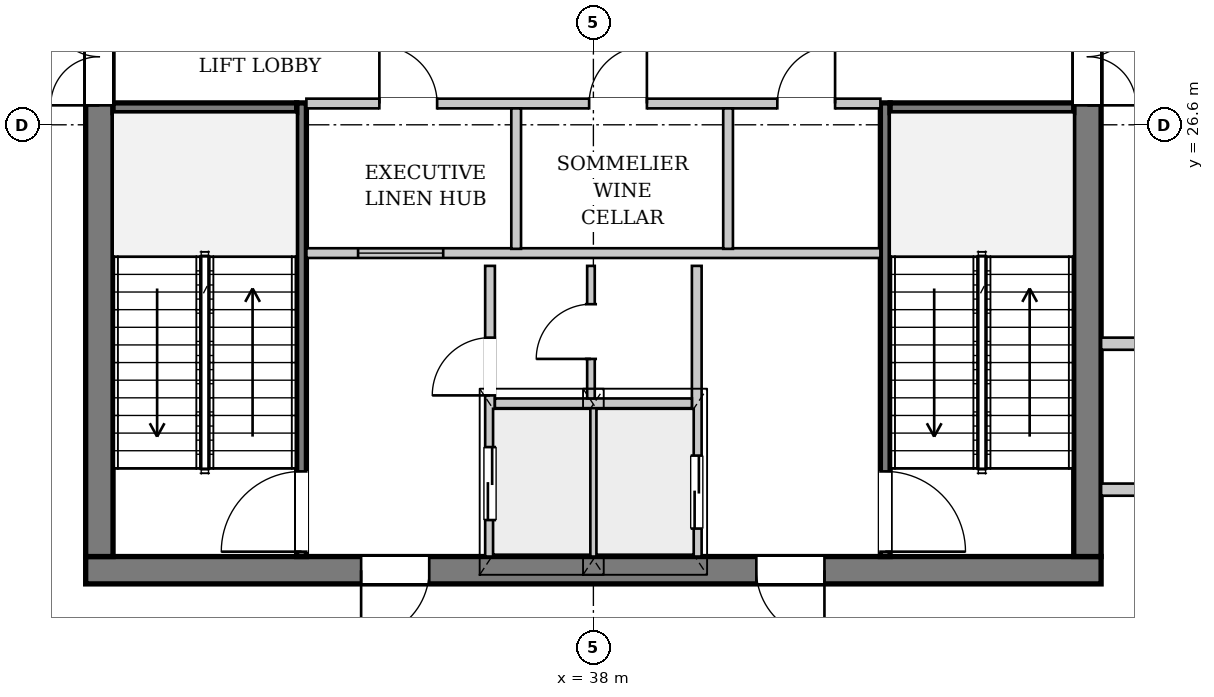
"""IFC4 building model, lengths in metres.
Left out: names, types, materials, properties, quantities, classifications, styles, units other than length and angle.
Written with IfcOpenShell. Run it as: python <this file> out.ifc"""

import sys

from ifc_helpers import new_model, si_unit, direction, frame, frame_2d, origin, place, context, subcontext, project, spatial, rectangle, extrude, source, transform, mapped, element, fill, save


model = new_model("IFC4")
c1 = context("Model", 3, precision=1e-05, world=origin(), true_north=direction((0.0, 1.0)))
c2 = subcontext(c1, "Body", "Model", "MODEL_VIEW")
j1 = project(units=[si_unit("LENGTHUNIT", "METRE"), si_unit("PLANEANGLEUNIT", "RADIAN")], contexts=[c1])
p1 = place(None, origin())
s1 = spatial("IfcSite", under=j1, at=p1, CompositionType="ELEMENT")
p2 = place(p1, origin())
s2 = spatial("IfcBuilding", under=s1, at=p2, CompositionType="ELEMENT")
p3 = place(p2, frame((0.0, 0.0, 290.5)))
s3 = spatial("IfcBuildingStorey", under=s2, at=p3, CompositionType="ELEMENT", Elevation=290.5)
p4 = place(p3, frame((32.694, 12.155, 0.0), z_axis=(0.0, 0.0, 1.0), x_axis=(-0.89278116215, 0.450490617561, 0.0)))
e1 = element("IfcWall", 1, at=p4, inside=s3, PredefinedType="SOLIDWALL", context=c2, shape_type="SweptSolid", body=[
    extrude(rectangle(XDim=17.119, YDim=0.32, at=frame_2d((8.56, 0.0))), origin(), (0.0, 0.0, 1.0), 3.782),
])
p5 = place(p4, frame((4.728, 0.0, 0.0)))
e2 = element("IfcOpeningElement", 2, at=p5, cuts=e1, PredefinedType="OPENING", context=c2, shape_type="SweptSolid", body=[
    extrude(rectangle(XDim=1.5, YDim=2.3, at=frame_2d((0.75, 1.15))), frame((0.0, 0.17, 0.0), z_axis=(0.0, -1.0, 0.0), x_axis=(1.0, 0.0, 0.0)), (0.0, 0.0, 1.0), 0.34),
])
p6 = place(p4, frame((11.368, 0.0, 0.65)))
e3 = element("IfcOpeningElement", 3, at=p6, cuts=e1, PredefinedType="OPENING", context=c2, shape_type="SweptSolid", body=[
    extrude(rectangle(XDim=2.6, YDim=2.35, at=frame_2d((1.3, 1.175))), frame((0.0, 0.17, 0.0), z_axis=(0.0, -1.0, 0.0), x_axis=(1.0, 0.0, 0.0)), (0.0, 0.0, 1.0), 0.34),
])
p7 = place(p3, frame((46.35, 19.275, 0.0), z_axis=(0.0, 0.0, 1.0), x_axis=(-1.0, 0.0, 0.0)))
e4 = element("IfcWall", 4, at=p7, inside=s3, PredefinedType="SHEAR", context=c2, shape_type="SweptSolid", body=[
    extrude(rectangle(XDim=16.7, YDim=0.45, at=frame_2d((8.35, 0.0))), origin(), (0.0, 0.0, 1.0), 4.24),
])
p8 = place(p7, frame((4.55, 0.0, 0.0)))
e5 = element("IfcOpeningElement", 5, at=p8, cuts=e4, PredefinedType="OPENING", context=c2, shape_type="SweptSolid", body=[
    extrude(rectangle(XDim=1.12, YDim=2.25, at=frame_2d((0.56, 1.125))), frame((0.0, 0.235, 0.0), z_axis=(0.0, -1.0, 0.0), x_axis=(1.0, 0.0, 0.0)), (0.0, 0.0, 1.0), 0.47),
])
p9 = place(p7, frame((11.05, 0.0, 0.0)))
e6 = element("IfcOpeningElement", 6, at=p9, cuts=e4, PredefinedType="OPENING", context=c2, shape_type="SweptSolid", body=[
    extrude(rectangle(XDim=1.12, YDim=2.25, at=frame_2d((0.56, 1.125))), frame((0.0, 0.235, 0.0), z_axis=(0.0, -1.0, 0.0), x_axis=(1.0, 0.0, 0.0)), (0.0, 0.0, 1.0), 0.47),
])
p10 = place(p3, frame((29.875, 19.5, 0.0), z_axis=(0.0, 0.0, 1.0), x_axis=(0.0, 1.0, 0.0)))
e7 = element("IfcWall", 7, at=p10, inside=s3, PredefinedType="SHEAR", context=c2, shape_type="SweptSolid", body=[
    extrude(rectangle(XDim=14.2, YDim=0.45, at=frame_2d((7.1, 0.0))), origin(), (0.0, 0.0, 1.0), 4.24),
])
p11 = place(p10, frame((7.42, 0.0, 0.0)))
e8 = element("IfcOpeningElement", 8, at=p11, cuts=e7, PredefinedType="OPENING", context=c2, shape_type="SweptSolid", body=[
    extrude(rectangle(XDim=1.6, YDim=2.2, at=frame_2d((0.8, 1.1))), frame((0.0, 0.235, 0.0), z_axis=(0.0, -1.0, 0.0), x_axis=(1.0, 0.0, 0.0)), (0.0, 0.0, 1.0), 0.47),
])
p12 = place(p3, frame((46.125, 33.7, 0.0), z_axis=(0.0, 0.0, 1.0), x_axis=(0.0, -1.0, 0.0)))
e9 = element("IfcWall", 9, at=p12, inside=s3, PredefinedType="SHEAR", context=c2, shape_type="SweptSolid", body=[
    extrude(rectangle(XDim=14.2, YDim=0.45, at=frame_2d((7.1, 0.0))), origin(), (0.0, 0.0, 1.0), 4.24),
])
p13 = place(p12, frame((5.18, 0.0, 0.0)))
e10 = element("IfcOpeningElement", 10, at=p13, cuts=e9, PredefinedType="OPENING", context=c2, shape_type="SweptSolid", body=[
    extrude(rectangle(XDim=1.6, YDim=2.2, at=frame_2d((0.8, 1.1))), frame((0.0, 0.235, 0.0), z_axis=(0.0, -1.0, 0.0), x_axis=(1.0, 0.0, 0.0)), (0.0, 0.0, 1.0), 0.47),
])
p14 = place(p12, frame((2.05, 0.0, 0.0)))
e11 = element("IfcOpeningElement", 11, at=p14, cuts=e9, PredefinedType="OPENING", context=c2, shape_type="SweptSolid", body=[
    extrude(rectangle(XDim=0.95, YDim=2.1, at=frame_2d((0.475, 1.05))), frame((0.0, 0.235, 0.0), z_axis=(0.0, -1.0, 0.0), x_axis=(1.0, 0.0, 0.0)), (0.0, 0.0, 1.0), 0.47),
])
p15 = place(p3, frame((33.2, 19.5, 0.0), z_axis=(0.0, 0.0, 1.0), x_axis=(0.0, 1.0, 0.0)))
e12 = element("IfcWall", 12, at=p15, inside=s3, PredefinedType="PARTITIONING", context=c2, shape_type="SweptSolid", body=[
    extrude(rectangle(XDim=7.46, YDim=0.16, at=frame_2d((3.73, 0.0))), origin(), (0.0, 0.0, 1.0), 4.24),
])
p16 = place(p15, frame((0.08, 0.0, 0.0)))
e13 = element("IfcOpeningElement", 13, at=p16, cuts=e12, PredefinedType="OPENING", context=c2, shape_type="SweptSolid", body=[
    extrude(rectangle(XDim=1.32, YDim=2.2, at=frame_2d((0.66, 1.1))), frame((0.0, 0.09, 0.0), z_axis=(0.0, -1.0, 0.0), x_axis=(1.0, 0.0, 0.0)), (0.0, 0.0, 1.0), 0.18),
])
p17 = place(p3, frame((30.1, 26.88, 0.0), z_axis=(0.0, 0.0, 1.0), x_axis=(1.0, 0.0, 0.0)))
e14 = element("IfcWall", 14, at=p17, inside=s3, PredefinedType="PARTITIONING", context=c2, shape_type="SweptSolid", body=[
    extrude(rectangle(XDim=3.02, YDim=0.16, at=frame_2d((1.51, 0.0))), origin(), (0.0, 0.0, 1.0), 4.24),
])
p18 = place(p3, frame((42.8, 26.96, 0.0), z_axis=(0.0, 0.0, 1.0), x_axis=(0.0, -1.0, 0.0)))
e15 = element("IfcWall", 15, at=p18, inside=s3, PredefinedType="PARTITIONING", context=c2, shape_type="SweptSolid", body=[
    extrude(rectangle(XDim=7.46, YDim=0.16, at=frame_2d((3.73, 0.0))), origin(), (0.0, 0.0, 1.0), 4.24),
])
p19 = place(p18, frame((6.06, 0.0, 0.0)))
e16 = element("IfcOpeningElement", 16, at=p19, cuts=e15, PredefinedType="OPENING", context=c2, shape_type="SweptSolid", body=[
    extrude(rectangle(XDim=1.32, YDim=2.2, at=frame_2d((0.66, 1.1))), frame((0.0, 0.09, 0.0), z_axis=(0.0, -1.0, 0.0), x_axis=(1.0, 0.0, 0.0)), (0.0, 0.0, 1.0), 0.18),
])
p20 = place(p3, frame((42.88, 26.88, 0.0), z_axis=(0.0, 0.0, 1.0), x_axis=(1.0, 0.0, 0.0)))
e17 = element("IfcWall", 17, at=p20, inside=s3, PredefinedType="PARTITIONING", context=c2, shape_type="SweptSolid", body=[
    extrude(rectangle(XDim=3.02, YDim=0.16, at=frame_2d((1.51, 0.0))), origin(), (0.0, 0.0, 1.0), 4.24),
])
p21 = place(p3, frame((36.3, 19.5, 0.0), z_axis=(0.0, 0.0, 1.0), x_axis=(0.0, 1.0, 0.0)))
e18 = element("IfcWall", 18, at=p21, inside=s3, PredefinedType="PARTITIONING", context=c2, shape_type="SweptSolid", body=[
    extrude(rectangle(XDim=4.78, YDim=0.16, at=frame_2d((2.39, 0.0))), origin(), (0.0, 0.0, 1.0), 4.24),
])
p22 = place(p21, frame((0.6, 0.0, 0.0)))
e19 = element("IfcOpeningElement", 19, at=p22, cuts=e18, PredefinedType="OPENING", context=c2, shape_type="SweptSolid", body=[
    extrude(rectangle(XDim=1.2, YDim=2.2, at=frame_2d((0.6, 1.1))), frame((0.0, 0.09, 0.0), z_axis=(0.0, -1.0, 0.0), x_axis=(1.0, 0.0, 0.0)), (0.0, 0.0, 1.0), 0.18),
])
p23 = place(p21, frame((2.65, 0.0, 0.0)))
e20 = element("IfcOpeningElement", 20, at=p23, cuts=e18, PredefinedType="OPENING", context=c2, shape_type="SweptSolid", body=[
    extrude(rectangle(XDim=0.95, YDim=2.1, at=frame_2d((0.475, 1.05))), frame((0.0, 0.09, 0.0), z_axis=(0.0, -1.0, 0.0), x_axis=(1.0, 0.0, 0.0)), (0.0, 0.0, 1.0), 0.18),
])
p24 = place(p3, frame((39.7, 24.28, 0.0), z_axis=(0.0, 0.0, 1.0), x_axis=(0.0, -1.0, 0.0)))
e21 = element("IfcWall", 21, at=p24, inside=s3, PredefinedType="PARTITIONING", context=c2, shape_type="SweptSolid", body=[
    extrude(rectangle(XDim=4.78, YDim=0.16, at=frame_2d((2.39, 0.0))), origin(), (0.0, 0.0, 1.0), 4.24),
])
p25 = place(p24, frame((3.12, 0.0, 0.0)))
e22 = element("IfcOpeningElement", 22, at=p25, cuts=e21, PredefinedType="OPENING", context=c2, shape_type="SweptSolid", body=[
    extrude(rectangle(XDim=1.2, YDim=2.2, at=frame_2d((0.6, 1.1))), frame((0.0, 0.09, 0.0), z_axis=(0.0, -1.0, 0.0), x_axis=(1.0, 0.0, 0.0)), (0.0, 0.0, 1.0), 0.18),
])
p26 = place(p3, frame((38.0, 19.5, 0.0), z_axis=(0.0, 0.0, 1.0), x_axis=(0.0, 1.0, 0.0)))
e23 = element("IfcWall", 23, at=p26, inside=s3, PredefinedType="PARTITIONING", context=c2, shape_type="SweptSolid", body=[
    extrude(rectangle(XDim=2.46, YDim=0.125, at=frame_2d((1.23, 0.0))), origin(), (0.0, 0.0, 1.0), 4.24),
])
p27 = place(p3, frame((36.38, 22.02, 0.0), z_axis=(0.0, 0.0, 1.0), x_axis=(1.0, 0.0, 0.0)))
e24 = element("IfcWall", 24, at=p27, inside=s3, PredefinedType="PARTITIONING", context=c2, shape_type="SweptSolid", body=[
    extrude(rectangle(XDim=3.24, YDim=0.16, at=frame_2d((1.62, 0.0))), origin(), (0.0, 0.0, 1.0), 4.24),
])
p28 = place(p3, frame((33.28, 24.49, 0.0), z_axis=(0.0, 0.0, 1.0), x_axis=(1.0, 0.0, 0.0)))
e25 = element("IfcWall", 25, at=p28, inside=s3, PredefinedType="PARTITIONING", context=c2, shape_type="SweptSolid", body=[
    extrude(rectangle(XDim=9.44, YDim=0.16, at=frame_2d((4.72, 0.0))), origin(), (0.0, 0.0, 1.0), 4.24),
])
p29 = place(p28, frame((0.85, 0.0, 0.95)))
e26 = element("IfcOpeningElement", 26, at=p29, cuts=e25, PredefinedType="OPENING", context=c2, shape_type="SweptSolid", body=[
    extrude(rectangle(XDim=1.4, YDim=1.8, at=frame_2d((0.7, 0.9))), frame((0.0, 0.09, 0.0), z_axis=(0.0, -1.0, 0.0), x_axis=(1.0, 0.0, 0.0)), (0.0, 0.0, 1.0), 0.18),
])
p30 = place(p3, frame((37.96, 22.1, 0.0), z_axis=(0.0, 0.0, 1.0), x_axis=(0.0, 1.0, 0.0)))
e27 = element("IfcWall", 27, at=p30, inside=s3, PredefinedType="PARTITIONING", context=c2, shape_type="SweptSolid", body=[
    extrude(rectangle(XDim=2.18, YDim=0.125, at=frame_2d((1.09, 0.0))), origin(), (0.0, 0.0, 1.0), 4.24),
])
p31 = place(p30, frame((0.65, 0.0, 0.0)))
e28 = element("IfcOpeningElement", 28, at=p31, cuts=e27, PredefinedType="OPENING", context=c2, shape_type="SweptSolid", body=[
    extrude(rectangle(XDim=0.9, YDim=2.1, at=frame_2d((0.45, 1.05))), frame((0.0, 0.073, 0.0), z_axis=(0.0, -1.0, 0.0), x_axis=(1.0, 0.0, 0.0)), (0.0, 0.0, 1.0), 0.145),
])
p32 = place(p3, frame((33.28, 26.95, 0.0), z_axis=(0.0, 0.0, 1.0), x_axis=(1.0, 0.0, 0.0)))
e29 = element("IfcWall", 29, at=p32, inside=s3, PredefinedType="PARTITIONING", context=c2, shape_type="SweptSolid", body=[
    extrude(rectangle(XDim=9.44, YDim=0.16, at=frame_2d((4.72, 0.0))), origin(), (0.0, 0.0, 1.0), 4.24),
])
p33 = place(p32, frame((1.2, 0.0, 0.0)))
e30 = element("IfcOpeningElement", 30, at=p33, cuts=e29, PredefinedType="OPENING", context=c2, shape_type="SweptSolid", body=[
    extrude(rectangle(XDim=0.95, YDim=2.1, at=frame_2d((0.475, 1.05))), frame((0.0, 0.09, 0.0), z_axis=(0.0, -1.0, 0.0), x_axis=(1.0, 0.0, 0.0)), (0.0, 0.0, 1.0), 0.18),
])
p34 = place(p32, frame((4.65, 0.0, 0.0)))
e31 = element("IfcOpeningElement", 31, at=p34, cuts=e29, PredefinedType="OPENING", context=c2, shape_type="SweptSolid", body=[
    extrude(rectangle(XDim=0.95, YDim=2.1, at=frame_2d((0.475, 1.05))), frame((0.0, 0.09, 0.0), z_axis=(0.0, -1.0, 0.0), x_axis=(1.0, 0.0, 0.0)), (0.0, 0.0, 1.0), 0.18),
])
p35 = place(p32, frame((7.745, 0.0, 0.0)))
e32 = element("IfcOpeningElement", 32, at=p35, cuts=e29, PredefinedType="OPENING", context=c2, shape_type="SweptSolid", body=[
    extrude(rectangle(XDim=0.95, YDim=2.1, at=frame_2d((0.475, 1.05))), frame((0.0, 0.09, 0.0), z_axis=(0.0, -1.0, 0.0), x_axis=(1.0, 0.0, 0.0)), (0.0, 0.0, 1.0), 0.18),
])
for number, where, z_axis, x_axis in (
    (33, (36.73, 24.56, 0.0), (0.0, 0.0, 1.0), (0.0, 1.0, 0.0)),
    (34, (40.215, 24.56, 0.0), (0.0, 0.0, 1.0), (0.0, 1.0, 0.0)),
):
    element("IfcWall", number, at=place(p3, frame(where, z_axis=z_axis, x_axis=x_axis)), inside=s3, PredefinedType="PARTITIONING", context=c2, shape_type="SweptSolid", body=[
        extrude(rectangle(XDim=2.31, YDim=0.16, at=frame_2d((1.155, 0.0))), origin(), (0.0, 0.0, 1.0), 4.24),
    ])
for number, where, z_axis, x_axis in (
    (35, (46.35, 20.6, 0.0), (0.0, 0.0, 1.0), (1.0, 0.0, 0.0)),
    (36, (46.35, 23.0, 0.0), (0.0, 0.0, 1.0), (1.0, 0.0, 0.0)),
):
    element("IfcWall", number, at=place(p3, frame(where, z_axis=z_axis, x_axis=x_axis)), inside=s3, PredefinedType="PARTITIONING", context=c2, shape_type="SweptSolid", body=[
        extrude(rectangle(XDim=1.85, YDim=0.2, at=frame_2d((0.925, 0.0))), origin(), (0.0, 0.0, 1.0), 4.24),
    ])
m1 = source(origin(), c2, "Body", "SweptSolid", [
    extrude(rectangle(XDim=1.12, YDim=2.25, at=frame_2d((0.56, 1.125))), frame((0.0, 0.025, 0.0), z_axis=(0.0, -1.0, 0.0), x_axis=(1.0, 0.0, 0.0)), (0.0, 0.0, 1.0), 0.05),
])
p36 = place(p8, origin())
e37 = element("IfcDoor", 37, at=p36, inside=s3, OperationType="SINGLE_SWING_LEFT", PredefinedType="DOOR", context=c2, shape_type="MappedRepresentation", body=[
    mapped(m1, transform((0.0, 0.0, 0.0), x_axis=(1.0, 0.0, 0.0), y_axis=(0.0, 1.0, 0.0), z_axis=(0.0, 0.0, 1.0), scale=1.0)),
])
fill(e5, e37)
p37 = place(p9, origin())
e38 = element("IfcDoor", 38, at=p37, inside=s3, OperationType="SINGLE_SWING_RIGHT", PredefinedType="DOOR", context=c2, shape_type="MappedRepresentation", body=[
    mapped(m1, transform((0.0, 0.0, 0.0), x_axis=(1.0, 0.0, 0.0), y_axis=(0.0, 1.0, 0.0), z_axis=(0.0, 0.0, 1.0), scale=1.0)),
])
fill(e6, e38)
m2 = source(origin(), c2, "Body", "SweptSolid", [
    extrude(rectangle(XDim=1.6, YDim=2.2, at=frame_2d((0.8, 1.1))), frame((0.0, 0.025, 0.0), z_axis=(0.0, -1.0, 0.0), x_axis=(1.0, 0.0, 0.0)), (0.0, 0.0, 1.0), 0.05),
])
p38 = place(p11, origin())
e39 = element("IfcDoor", 39, at=p38, inside=s3, OperationType="DOUBLE_DOOR_SINGLE_SWING", PredefinedType="DOOR", context=c2, shape_type="MappedRepresentation", body=[
    mapped(m2, transform((0.0, 0.0, 0.0), x_axis=(1.0, 0.0, 0.0), y_axis=(0.0, 1.0, 0.0), z_axis=(0.0, 0.0, 1.0), scale=1.0)),
])
fill(e8, e39)
p39 = place(p13, origin())
e40 = element("IfcDoor", 40, at=p39, inside=s3, OperationType="DOUBLE_DOOR_SINGLE_SWING", PredefinedType="DOOR", context=c2, shape_type="MappedRepresentation", body=[
    mapped(m2, transform((0.0, 0.0, 0.0), x_axis=(1.0, 0.0, 0.0), y_axis=(0.0, 1.0, 0.0), z_axis=(0.0, 0.0, 1.0), scale=1.0)),
])
fill(e10, e40)
m3 = source(origin(), c2, "Body", "SweptSolid", [
    extrude(rectangle(XDim=1.32, YDim=2.2, at=frame_2d((0.66, 1.1))), frame((0.0, 0.025, 0.0), z_axis=(0.0, -1.0, 0.0), x_axis=(1.0, 0.0, 0.0)), (0.0, 0.0, 1.0), 0.05),
])
p40 = place(p16, origin())
e41 = element("IfcDoor", 41, at=p40, inside=s3, OperationType="SINGLE_SWING_LEFT", PredefinedType="DOOR", context=c2, shape_type="MappedRepresentation", body=[
    mapped(m3, transform((0.0, 0.0, 0.0), x_axis=(1.0, 0.0, 0.0), y_axis=(0.0, 1.0, 0.0), z_axis=(0.0, 0.0, 1.0), scale=1.0)),
])
fill(e13, e41)
p41 = place(p19, origin())
e42 = element("IfcDoor", 42, at=p41, inside=s3, OperationType="SINGLE_SWING_RIGHT", PredefinedType="DOOR", context=c2, shape_type="MappedRepresentation", body=[
    mapped(m3, transform((0.0, 0.0, 0.0), x_axis=(1.0, 0.0, 0.0), y_axis=(0.0, 1.0, 0.0), z_axis=(0.0, 0.0, 1.0), scale=1.0)),
])
fill(e16, e42)
m4 = source(origin(), c2, "Body", "SweptSolid", [
    extrude(rectangle(XDim=1.2, YDim=2.2, at=frame_2d((0.6, 1.1))), frame((0.0, 0.025, 0.0), z_axis=(0.0, -1.0, 0.0), x_axis=(1.0, 0.0, 0.0)), (0.0, 0.0, 1.0), 0.05),
])
p42 = place(p22, origin())
e43 = element("IfcDoor", 43, at=p42, inside=s3, OperationType="DOUBLE_DOOR_SLIDING", PredefinedType="DOOR", context=c2, shape_type="MappedRepresentation", body=[
    mapped(m4, transform((0.0, 0.0, 0.0), x_axis=(1.0, 0.0, 0.0), y_axis=(0.0, 1.0, 0.0), z_axis=(0.0, 0.0, 1.0), scale=1.0)),
])
fill(e19, e43)
m5 = source(origin(), c2, "Body", "SweptSolid", [
    extrude(rectangle(XDim=0.95, YDim=2.1, at=frame_2d((0.475, 1.05))), frame((0.0, 0.025, 0.0), z_axis=(0.0, -1.0, 0.0), x_axis=(1.0, 0.0, 0.0)), (0.0, 0.0, 1.0), 0.05),
])
p43 = place(p23, origin())
e44 = element("IfcDoor", 44, at=p43, inside=s3, OperationType="SINGLE_SWING_LEFT", PredefinedType="DOOR", context=c2, shape_type="MappedRepresentation", body=[
    mapped(m5, transform((0.0, 0.0, 0.0), x_axis=(1.0, 0.0, 0.0), y_axis=(0.0, 1.0, 0.0), z_axis=(0.0, 0.0, 1.0), scale=1.0)),
])
fill(e20, e44)
m6 = source(origin(), c2, "Body", "SweptSolid", [
    extrude(rectangle(XDim=0.9, YDim=2.1, at=frame_2d((0.45, 1.05))), frame((0.0, 0.025, 0.0), z_axis=(0.0, -1.0, 0.0), x_axis=(1.0, 0.0, 0.0)), (0.0, 0.0, 1.0), 0.05),
])
p44 = place(p31, origin())
e45 = element("IfcDoor", 45, at=p44, inside=s3, OperationType="SINGLE_SWING_LEFT", PredefinedType="DOOR", context=c2, shape_type="MappedRepresentation", body=[
    mapped(m6, transform((0.0, 0.0, 0.0), x_axis=(1.0, 0.0, 0.0), y_axis=(0.0, 1.0, 0.0), z_axis=(0.0, 0.0, 1.0), scale=1.0)),
])
fill(e28, e45)
p45 = place(p25, origin())
e46 = element("IfcDoor", 46, at=p45, inside=s3, OperationType="DOUBLE_DOOR_SLIDING", PredefinedType="DOOR", context=c2, shape_type="MappedRepresentation", body=[
    mapped(m4, transform((0.0, 0.0, 0.0), x_axis=(1.0, 0.0, 0.0), y_axis=(0.0, 1.0, 0.0), z_axis=(0.0, 0.0, 1.0), scale=1.0)),
])
fill(e22, e46)
p46 = place(p33, origin())
e47 = element("IfcDoor", 47, at=p46, inside=s3, OperationType="SINGLE_SWING_LEFT", PredefinedType="DOOR", context=c2, shape_type="MappedRepresentation", body=[
    mapped(m5, transform((0.0, 0.0, 0.0), x_axis=(1.0, 0.0, 0.0), y_axis=(0.0, 1.0, 0.0), z_axis=(0.0, 0.0, 1.0), scale=1.0)),
])
fill(e30, e47)
p47 = place(p34, origin())
e48 = element("IfcDoor", 48, at=p47, inside=s3, OperationType="SINGLE_SWING_RIGHT", PredefinedType="DOOR", context=c2, shape_type="MappedRepresentation", body=[
    mapped(m5, transform((0.0, 0.0, 0.0), x_axis=(1.0, 0.0, 0.0), y_axis=(0.0, 1.0, 0.0), z_axis=(0.0, 0.0, 1.0), scale=1.0)),
])
fill(e31, e48)
p48 = place(p35, origin())
e49 = element("IfcDoor", 49, at=p48, inside=s3, OperationType="SINGLE_SWING_RIGHT", PredefinedType="DOOR", context=c2, shape_type="MappedRepresentation", body=[
    mapped(m5, transform((0.0, 0.0, 0.0), x_axis=(1.0, 0.0, 0.0), y_axis=(0.0, 1.0, 0.0), z_axis=(0.0, 0.0, 1.0), scale=1.0)),
])
fill(e32, e49)
m7 = source(origin(), c2, "Body", "SweptSolid", [
    extrude(rectangle(XDim=1.4, YDim=1.8, at=frame_2d((0.7, 0.9))), frame((0.0, 0.03, 0.0), z_axis=(0.0, -1.0, 0.0), x_axis=(1.0, 0.0, 0.0)), (0.0, 0.0, 1.0), 0.06),
])
p49 = place(p29, origin())
e50 = element("IfcWindow", 50, at=p49, inside=s3, PartitioningType="SINGLE_PANEL", PredefinedType="WINDOW", context=c2, shape_type="MappedRepresentation", body=[
    mapped(m7, transform((0.0, 0.0, 0.0), x_axis=(1.0, 0.0, 0.0), y_axis=(0.0, 1.0, 0.0), z_axis=(0.0, 0.0, 1.0), scale=1.0)),
])
fill(e26, e50)
save(model, sys.argv[1])
